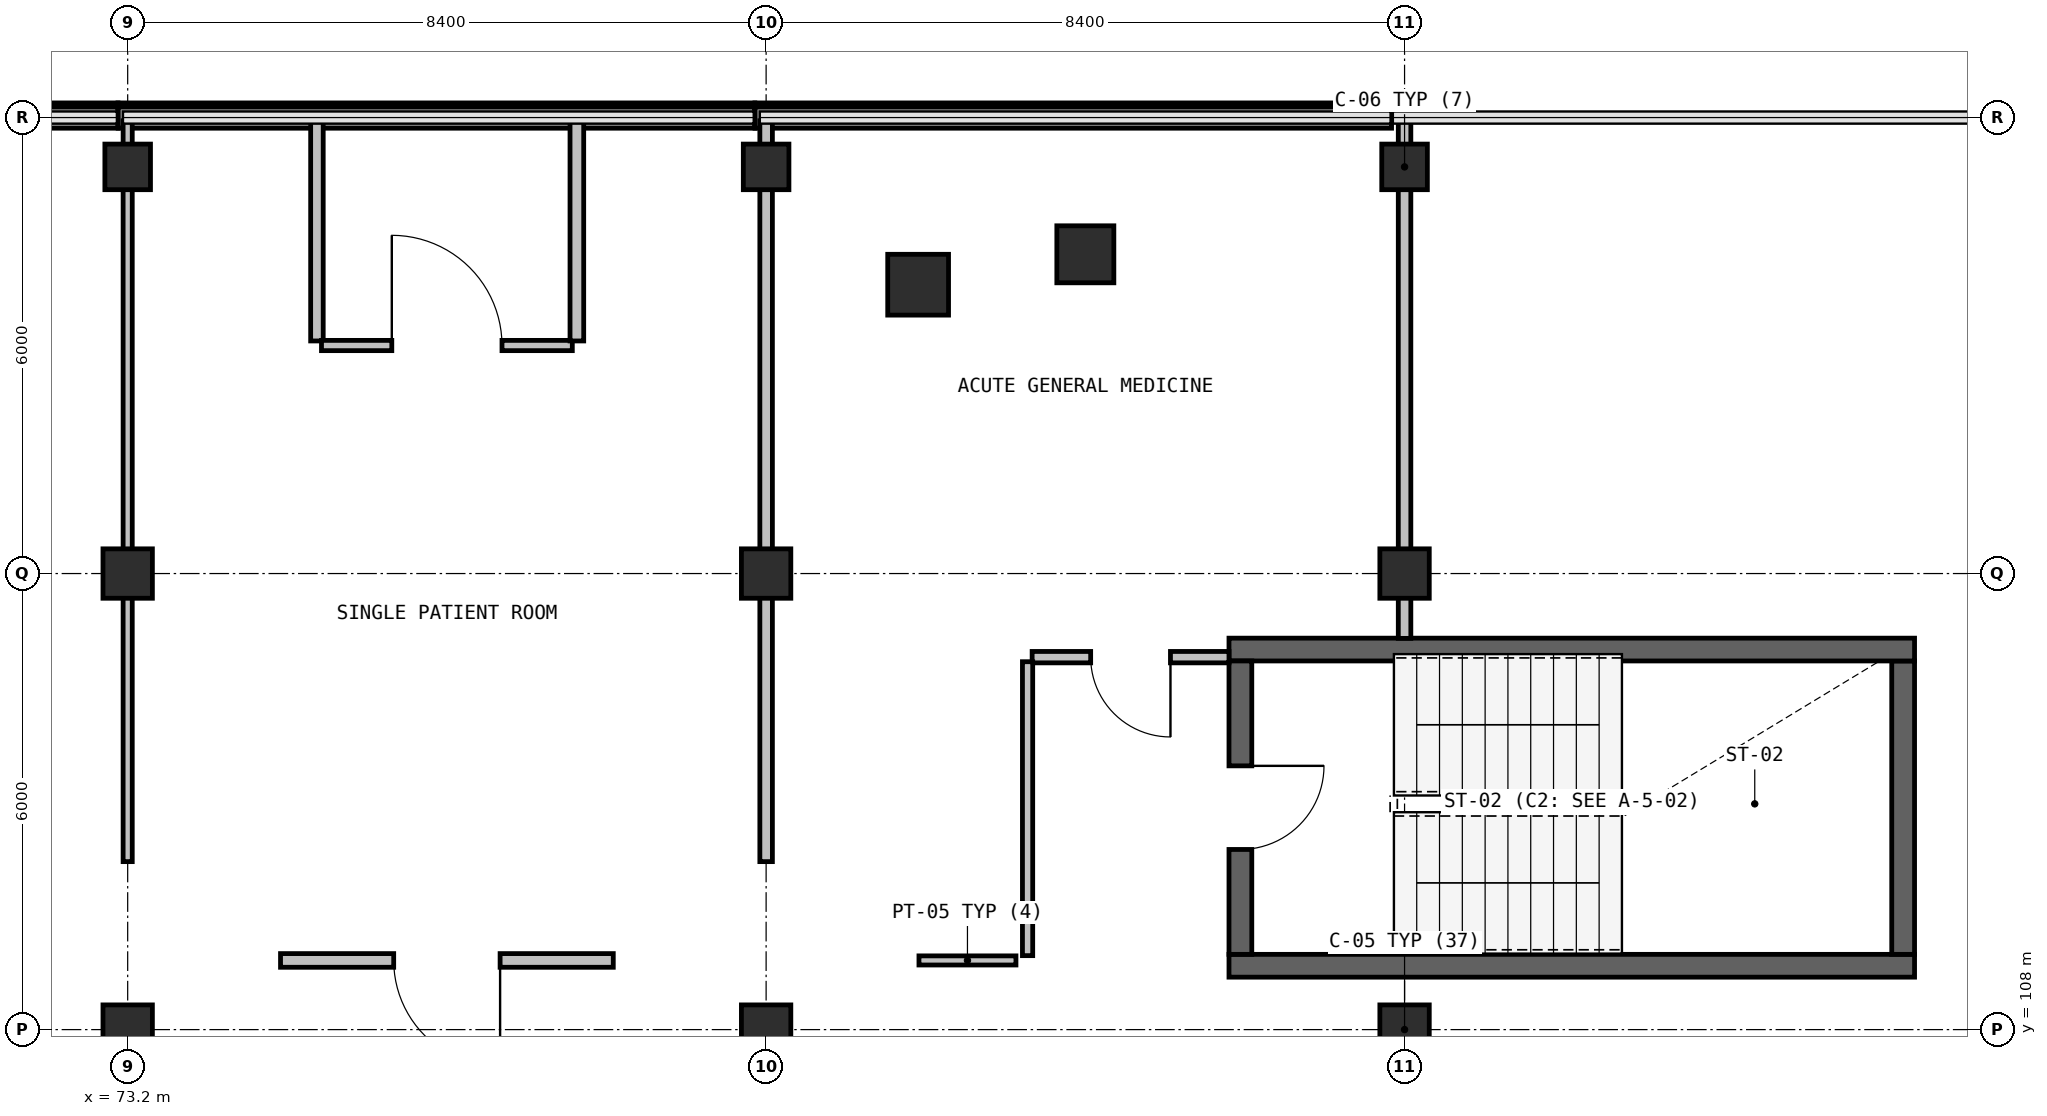
"""IFC4 building model, lengths in metres.
Left out: names, types, materials, properties, quantities, classifications, styles, units other than length and angle.
Written with IfcOpenShell. Run it as: python <this file> out.ifc"""

import sys

from ifc_helpers import new_model, si_unit, direction, frame, frame_2d, origin, origin_2d, place, context, subcontext, project, spatial, rectangle, extrude, element, fill, save


model = new_model("IFC4")
c1 = context("Model", 3, precision=1e-05, world=origin(), true_north=direction((0.0, 1.0)))
c2 = subcontext(c1, "Body", "Model", "MODEL_VIEW")
j1 = project(units=[si_unit("LENGTHUNIT", "METRE"), si_unit("PLANEANGLEUNIT", "RADIAN")], contexts=[c1])
p1 = place(None, origin())
s1 = spatial("IfcSite", under=j1, at=p1, CompositionType="ELEMENT")
p2 = place(p1, origin())
s2 = spatial("IfcBuilding", under=s1, at=p2, CompositionType="ELEMENT")
p3 = place(p2, frame((0.0, 0.0, 23.25)))
s3 = spatial("IfcBuildingStorey", under=s2, at=p3, CompositionType="ELEMENT", Elevation=23.25)
p4 = place(p3, frame((83.6, 117.8, 0.0), z_axis=(0.0, 0.0, 1.0), x_axis=(1.0, 0.0, 0.0)))
e1 = element("IfcColumn", 1, at=p4, inside=s3, PredefinedType="COLUMN", context=c2, shape_type="SweptSolid", body=[
    extrude(rectangle(XDim=0.8, YDim=0.8, at=origin_2d()), origin(), (0.0, 0.0, 1.0), 4.05),
])
p5 = place(p3, frame((85.8, 118.2, 0.0), z_axis=(0.0, 0.0, 1.0), x_axis=(1.0, 0.0, 0.0)))
e2 = element("IfcColumn", 2, at=p5, inside=s3, PredefinedType="COLUMN", context=c2, shape_type="SweptSolid", body=[
    extrude(rectangle(XDim=0.75, YDim=0.75, at=origin_2d()), origin(), (0.0, 0.0, 1.0), 4.05),
])
for number, where, z_axis, x_axis in (
    (3, (73.2, 108.0, 0.0), (0.0, 0.0, 1.0), (1.0, 0.0, 0.0)),
    (4, (73.2, 114.0, 0.0), (0.0, 0.0, 1.0), (1.0, 0.0, 0.0)),
):
    element("IfcColumn", number, at=place(p3, frame(where, z_axis=z_axis, x_axis=x_axis)), inside=s3, PredefinedType="COLUMN", context=c2, shape_type="SweptSolid", body=[
        extrude(rectangle(XDim=0.65, YDim=0.65, at=origin_2d()), origin(), (0.0, 0.0, 1.0), 4.05),
    ])
p6 = place(p3, frame((73.2, 119.35, 0.0), z_axis=(0.0, 0.0, 1.0), x_axis=(1.0, 0.0, 0.0)))
e5 = element("IfcColumn", 5, at=p6, inside=s3, PredefinedType="COLUMN", context=c2, shape_type="SweptSolid", body=[
    extrude(rectangle(XDim=0.6, YDim=0.6, at=origin_2d()), origin(), (0.0, 0.0, 1.0), 4.05),
])
for number, where, z_axis, x_axis in (
    (6, (81.6, 108.0, 0.0), (0.0, 0.0, 1.0), (1.0, 0.0, 0.0)),
    (7, (81.6, 114.0, 0.0), (0.0, 0.0, 1.0), (1.0, 0.0, 0.0)),
):
    element("IfcColumn", number, at=place(p3, frame(where, z_axis=z_axis, x_axis=x_axis)), inside=s3, PredefinedType="COLUMN", context=c2, shape_type="SweptSolid", body=[
        extrude(rectangle(XDim=0.65, YDim=0.65, at=origin_2d()), origin(), (0.0, 0.0, 1.0), 4.05),
    ])
p7 = place(p3, frame((81.6, 119.35, 0.0), z_axis=(0.0, 0.0, 1.0), x_axis=(1.0, 0.0, 0.0)))
e8 = element("IfcColumn", 8, at=p7, inside=s3, PredefinedType="COLUMN", context=c2, shape_type="SweptSolid", body=[
    extrude(rectangle(XDim=0.6, YDim=0.6, at=origin_2d()), origin(), (0.0, 0.0, 1.0), 4.05),
])
for number, where, z_axis, x_axis in (
    (9, (90.0, 108.0, 0.0), (0.0, 0.0, 1.0), (1.0, 0.0, 0.0)),
    (10, (90.0, 114.0, 0.0), (0.0, 0.0, 1.0), (1.0, 0.0, 0.0)),
):
    element("IfcColumn", number, at=place(p3, frame(where, z_axis=z_axis, x_axis=x_axis)), inside=s3, PredefinedType="COLUMN", context=c2, shape_type="SweptSolid", body=[
        extrude(rectangle(XDim=0.65, YDim=0.65, at=origin_2d()), origin(), (0.0, 0.0, 1.0), 4.05),
    ])
p8 = place(p3, frame((90.0, 119.35, 0.0), z_axis=(0.0, 0.0, 1.0), x_axis=(1.0, 0.0, 0.0)))
e11 = element("IfcColumn", 11, at=p8, inside=s3, PredefinedType="COLUMN", context=c2, shape_type="SweptSolid", body=[
    extrude(rectangle(XDim=0.6, YDim=0.6, at=origin_2d()), origin(), (0.0, 0.0, 1.0), 4.05),
])
for number, where, z_axis, x_axis in (
    (12, (64.696, 119.999, 0.0), (0.0, 0.0, 1.0), (1.0, 0.0, 0.0)),
    (13, (73.075, 119.999, 0.0), (0.0, 0.0, 1.0), (1.0, 0.0, 0.0)),
    (14, (81.454, 119.999, 0.0), (0.0, 0.0, 1.0), (1.0, 0.0, 0.0)),
):
    element("IfcWall", number, at=place(p3, frame(where, z_axis=z_axis, x_axis=x_axis)), inside=s3, PredefinedType="SOLIDWALL", context=c2, shape_type="SweptSolid", body=[
        extrude(rectangle(XDim=8.375, YDim=0.28, at=frame_2d((4.188, 0.0))), origin(), (0.0, 0.0, 1.0), 0.94),
    ])
p9 = place(p3, frame((87.69, 108.84, 0.0), z_axis=(0.0, 0.0, 1.0), x_axis=(1.0, 0.0, 0.0)))
e15 = element("IfcWall", 15, at=p9, inside=s3, PredefinedType="SHEAR", context=c2, shape_type="SweptSolid", body=[
    extrude(rectangle(XDim=9.02, YDim=0.3, at=frame_2d((4.51, 0.0))), origin(), (0.0, 0.0, 1.0), 3.775),
])
p10 = place(p3, frame((96.56, 108.99, 0.0), z_axis=(0.0, 0.0, 1.0), x_axis=(0.0, 1.0, 0.0)))
e16 = element("IfcWall", 16, at=p10, inside=s3, PredefinedType="SHEAR", context=c2, shape_type="SweptSolid", body=[
    extrude(rectangle(XDim=3.86, YDim=0.3, at=frame_2d((1.93, 0.0))), origin(), (0.0, 0.0, 1.0), 3.775),
])
p11 = place(p3, frame((96.71, 113.0, 0.0), z_axis=(0.0, 0.0, 1.0), x_axis=(-1.0, 0.0, 0.0)))
e17 = element("IfcWall", 17, at=p11, inside=s3, PredefinedType="SHEAR", context=c2, shape_type="SweptSolid", body=[
    extrude(rectangle(XDim=9.02, YDim=0.3, at=frame_2d((4.51, 0.0))), origin(), (0.0, 0.0, 1.0), 3.775),
])
p12 = place(p3, frame((87.84, 112.85, 0.0), z_axis=(0.0, 0.0, 1.0), x_axis=(0.0, -1.0, 0.0)))
e18 = element("IfcWall", 18, at=p12, inside=s3, PredefinedType="SHEAR", context=c2, shape_type="SweptSolid", body=[
    extrude(rectangle(XDim=3.86, YDim=0.3, at=frame_2d((1.93, 0.0))), origin(), (0.0, 0.0, 1.0), 3.775),
])
p13 = place(p12, frame((1.38, 0.0, 0.0)))
e19 = element("IfcOpeningElement", 19, at=p13, cuts=e18, PredefinedType="OPENING", context=c2, shape_type="SweptSolid", body=[
    extrude(rectangle(XDim=1.1, YDim=2.15, at=frame_2d((0.55, 1.075))), frame((0.0, 0.16, 0.0), z_axis=(0.0, -1.0, 0.0), x_axis=(1.0, 0.0, 0.0)), (0.0, 0.0, 1.0), 0.32),
])
p14 = place(p3, frame((73.2, 119.957, 0.0), z_axis=(0.0, 0.0, 1.0), x_axis=(0.0, -1.0, 0.0)))
e20 = element("IfcWall", 20, at=p14, inside=s3, PredefinedType="PARTITIONING", context=c2, shape_type="SweptSolid", body=[
    extrude(rectangle(XDim=9.747, YDim=0.12, at=frame_2d((4.874, 0.0))), origin(), (0.0, 0.0, 1.0), 3.175),
])
p15 = place(p3, frame((79.589, 108.91, 0.0), z_axis=(0.0, 0.0, 1.0), x_axis=(-1.0, 0.0, 0.0)))
e21 = element("IfcWall", 21, at=p15, inside=s3, PredefinedType="PARTITIONING", context=c2, shape_type="SweptSolid", body=[
    extrude(rectangle(XDim=4.378, YDim=0.18, at=frame_2d((2.189, 0.0))), origin(), (0.0, 0.0, 1.0), 3.775),
])
p16 = place(p15, frame((1.489, 0.0, 0.0)))
e22 = element("IfcOpeningElement", 22, at=p16, cuts=e21, PredefinedType="OPENING", context=c2, shape_type="SweptSolid", body=[
    extrude(rectangle(XDim=1.4, YDim=2.15, at=frame_2d((0.7, 1.075))), frame((0.0, 0.1, 0.0), z_axis=(0.0, -1.0, 0.0), x_axis=(1.0, 0.0, 0.0)), (0.0, 0.0, 1.0), 0.2),
])
p17 = place(p3, frame((75.69, 119.957, 0.0), z_axis=(0.0, 0.0, 1.0), x_axis=(0.0, -1.0, 0.0)))
e23 = element("IfcWall", 23, at=p17, inside=s3, PredefinedType="PARTITIONING", context=c2, shape_type="SweptSolid", body=[
    extrude(rectangle(XDim=2.897, YDim=0.165, at=frame_2d((1.448, 0.0))), origin(), (0.0, 0.0, 1.0), 3.775),
])
p18 = place(p3, frame((75.75, 117.0, 0.0), z_axis=(0.0, 0.0, 1.0), x_axis=(1.0, 0.0, 0.0)))
e24 = element("IfcWall", 24, at=p18, inside=s3, PredefinedType="PARTITIONING", context=c2, shape_type="SweptSolid", body=[
    extrude(rectangle(XDim=3.3, YDim=0.135, at=frame_2d((1.65, 0.0))), origin(), (0.0, 0.0, 1.0), 3.775),
])
p19 = place(p18, frame((0.925, 0.0, 0.0)))
e25 = element("IfcOpeningElement", 25, at=p19, cuts=e24, PredefinedType="OPENING", context=c2, shape_type="SweptSolid", body=[
    extrude(rectangle(XDim=1.45, YDim=2.15, at=frame_2d((0.725, 1.075))), frame((0.0, 0.077, 0.0), z_axis=(0.0, -1.0, 0.0), x_axis=(1.0, 0.0, 0.0)), (0.0, 0.0, 1.0), 0.155),
])
p20 = place(p3, frame((79.11, 117.06, 0.0), z_axis=(0.0, 0.0, 1.0), x_axis=(0.0, 1.0, 0.0)))
e26 = element("IfcWall", 26, at=p20, inside=s3, PredefinedType="PARTITIONING", context=c2, shape_type="SweptSolid", body=[
    extrude(rectangle(XDim=2.897, YDim=0.18, at=frame_2d((1.448, 0.0))), origin(), (0.0, 0.0, 1.0), 3.775),
])
p21 = place(p3, frame((81.6, 119.957, 0.0), z_axis=(0.0, 0.0, 1.0), x_axis=(0.0, -1.0, 0.0)))
e27 = element("IfcWall", 27, at=p21, inside=s3, PredefinedType="PARTITIONING", context=c2, shape_type="SweptSolid", body=[
    extrude(rectangle(XDim=9.747, YDim=0.165, at=frame_2d((4.874, 0.0))), origin(), (0.0, 0.0, 1.0), 3.175),
])
p22 = place(p3, frame((90.0, 119.988, 0.0), z_axis=(0.0, 0.0, 1.0), x_axis=(0.0, -1.0, 0.0)))
e28 = element("IfcWall", 28, at=p22, inside=s3, PredefinedType="PARTITIONING", context=c2, shape_type="SweptSolid", body=[
    extrude(rectangle(XDim=6.841, YDim=0.165, at=frame_2d((3.42, 0.0))), origin(), (0.0, 0.0, 1.0), 3.175),
])
p23 = place(p3, frame((87.69, 112.9, 0.0), z_axis=(0.0, 0.0, 1.0), x_axis=(-1.0, 0.0, 0.0)))
e29 = element("IfcWall", 29, at=p23, inside=s3, PredefinedType="PARTITIONING", context=c2, shape_type="SweptSolid", body=[
    extrude(rectangle(XDim=2.59, YDim=0.15, at=frame_2d((1.295, 0.0))), origin(), (0.0, 0.0, 1.0), 3.775),
])
p24 = place(p23, frame((0.77, 0.0, 0.0)))
e30 = element("IfcOpeningElement", 30, at=p24, cuts=e29, PredefinedType="OPENING", context=c2, shape_type="SweptSolid", body=[
    extrude(rectangle(XDim=1.05, YDim=2.15, at=frame_2d((0.525, 1.075))), frame((0.0, 0.085, 0.0), z_axis=(0.0, -1.0, 0.0), x_axis=(1.0, 0.0, 0.0)), (0.0, 0.0, 1.0), 0.17),
])
p25 = place(p3, frame((85.04, 112.84, 0.0), z_axis=(0.0, 0.0, 1.0), x_axis=(0.0, -1.0, 0.0)))
e31 = element("IfcWall", 31, at=p25, inside=s3, PredefinedType="PARTITIONING", context=c2, shape_type="SweptSolid", body=[
    extrude(rectangle(XDim=3.867, YDim=0.135, at=frame_2d((1.934, 0.0))), origin(), (0.0, 0.0, 1.0), 3.775),
])
p26 = place(p3, frame((84.887, 108.91, 0.0), z_axis=(0.0, 0.0, 1.0), x_axis=(-1.0, 0.0, 0.0)))
e32 = element("IfcWall", 32, at=p26, inside=s3, PredefinedType="PARTITIONING", context=c2, shape_type="SweptSolid", body=[
    extrude(rectangle(XDim=1.276, YDim=0.12, at=frame_2d((0.638, 0.0))), origin(), (0.0, 0.0, 1.0), 3.775),
])
p27 = place(p13, origin())
e33 = element("IfcDoor", 33, at=p27, inside=s3, OperationType="SINGLE_SWING_RIGHT", PredefinedType="DOOR", context=c2, shape_type="SweptSolid", body=[
    extrude(rectangle(XDim=1.1, YDim=2.15, at=frame_2d((0.55, 1.075))), frame((0.0, 0.025, 0.0), z_axis=(0.0, -1.0, 0.0), x_axis=(1.0, 0.0, 0.0)), (0.0, 0.0, 1.0), 0.05),
])
fill(e19, e33)
p28 = place(p16, origin())
e34 = element("IfcDoor", 34, at=p28, inside=s3, OperationType="SINGLE_SWING_LEFT", PredefinedType="DOOR", context=c2, shape_type="SweptSolid", body=[
    extrude(rectangle(XDim=1.4, YDim=2.15, at=frame_2d((0.7, 1.075))), frame((0.0, 0.025, 0.0), z_axis=(0.0, -1.0, 0.0), x_axis=(1.0, 0.0, 0.0)), (0.0, 0.0, 1.0), 0.05),
])
fill(e22, e34)
p29 = place(p19, origin())
e35 = element("IfcDoor", 35, at=p29, inside=s3, OperationType="SINGLE_SWING_RIGHT", PredefinedType="DOOR", context=c2, shape_type="SweptSolid", body=[
    extrude(rectangle(XDim=1.45, YDim=2.15, at=frame_2d((0.725, 1.075))), frame((0.0, 0.025, 0.0), z_axis=(0.0, -1.0, 0.0), x_axis=(1.0, 0.0, 0.0)), (0.0, 0.0, 1.0), 0.05),
])
fill(e25, e35)
p30 = place(p24, origin())
e36 = element("IfcDoor", 36, at=p30, inside=s3, OperationType="SINGLE_SWING_LEFT", PredefinedType="DOOR", context=c2, shape_type="SweptSolid", body=[
    extrude(rectangle(XDim=1.05, YDim=2.15, at=frame_2d((0.525, 1.075))), frame((0.0, 0.025, 0.0), z_axis=(0.0, -1.0, 0.0), x_axis=(1.0, 0.0, 0.0)), (0.0, 0.0, 1.0), 0.05),
])
fill(e30, e36)
save(model, sys.argv[1])
